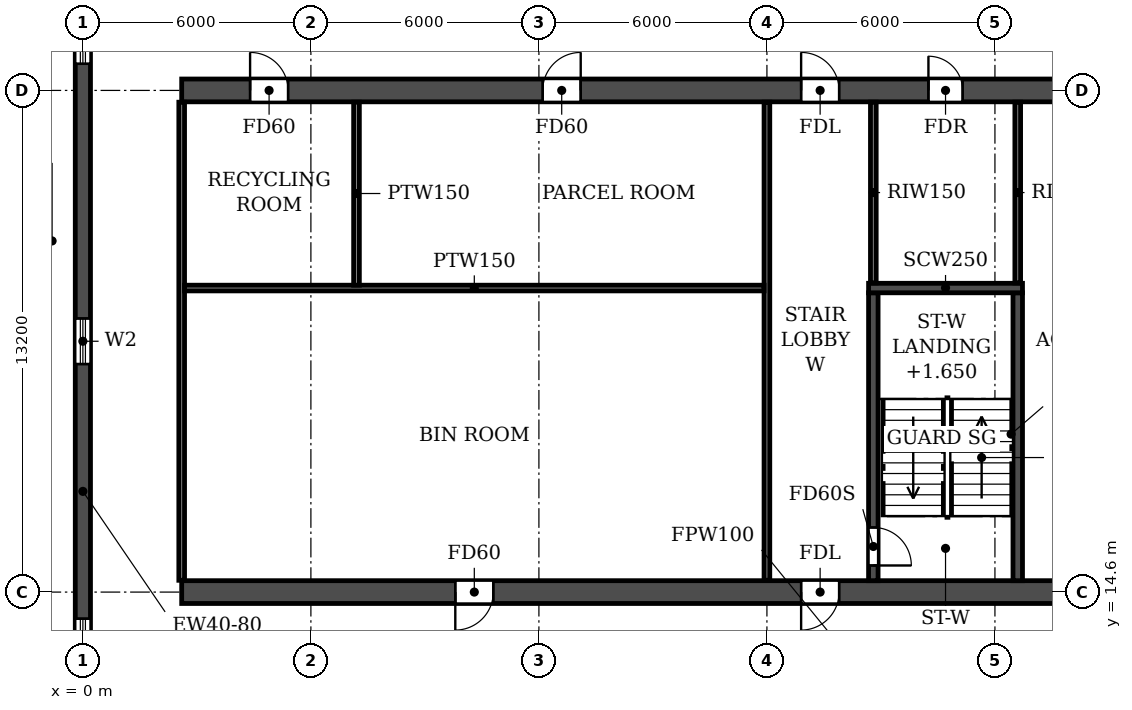
"""IFC4 building model, lengths in metres.
Left out: names, types, materials, properties, quantities, classifications, styles, units other than length and angle.
Written with IfcOpenShell. Run it as: python <this file> out.ifc"""

import sys

from ifc_helpers import new_model, si_unit, direction, frame, frame_2d, origin, place, context, subcontext, project, spatial, rectangle, extrude, element, fill, save


model = new_model("IFC4")
c1 = context("Model", 3, precision=1e-05, world=origin(), true_north=direction((0.0, 1.0)))
c2 = subcontext(c1, "Body", "Model", "MODEL_VIEW")
j1 = project(units=[si_unit("LENGTHUNIT", "METRE"), si_unit("PLANEANGLEUNIT", "RADIAN")], contexts=[c1])
p1 = place(None, origin())
s1 = spatial("IfcSite", under=j1, at=p1, CompositionType="ELEMENT")
p2 = place(p1, origin())
s2 = spatial("IfcBuilding", under=s1, at=p2, CompositionType="ELEMENT")
p3 = place(p2, frame((0.0, 0.0, 23.4)))
s3 = spatial("IfcBuildingStorey", under=s2, at=p3, CompositionType="ELEMENT", Elevation=23.4)
p4 = place(p3, frame((0.0, 4.683, 0.0), z_axis=(0.0, 0.0, 1.0), x_axis=(0.0, 1.0, 0.0)))
e1 = element("IfcWall", 1, at=p4, inside=s3, PredefinedType="SHEAR", context=c2, shape_type="SweptSolid", body=[
    extrude(rectangle(XDim=35.434, YDim=0.4, at=frame_2d((17.717, 0.0))), origin(), (0.0, 0.0, 1.0), 3.05),
])
p5 = place(p4, frame((23.817, 0.0, 0.9)))
e2 = element("IfcOpeningElement", 2, at=p5, cuts=e1, PredefinedType="OPENING", context=c2, shape_type="SweptSolid", body=[
    extrude(rectangle(XDim=1.2, YDim=1.5, at=frame_2d((0.6, 0.75))), frame((0.0, 0.21, 0.0), z_axis=(0.0, -1.0, 0.0), x_axis=(1.0, 0.0, 0.0)), (0.0, 0.0, 1.0), 0.42),
])
p6 = place(p4, frame((8.017, 0.0, 0.9)))
e3 = element("IfcOpeningElement", 3, at=p6, cuts=e1, PredefinedType="OPENING", context=c2, shape_type="SweptSolid", body=[
    extrude(rectangle(XDim=1.2, YDim=1.5, at=frame_2d((0.6, 0.75))), frame((0.0, 0.21, 0.0), z_axis=(0.0, -1.0, 0.0), x_axis=(1.0, 0.0, 0.0)), (0.0, 0.0, 1.0), 0.42),
])
p7 = place(p4, frame((15.917, 0.0, 0.9)))
e4 = element("IfcOpeningElement", 4, at=p7, cuts=e1, PredefinedType="OPENING", context=c2, shape_type="SweptSolid", body=[
    extrude(rectangle(XDim=1.2, YDim=1.5, at=frame_2d((0.6, 0.75))), frame((0.0, 0.21, 0.0), z_axis=(0.0, -1.0, 0.0), x_axis=(1.0, 0.0, 0.0)), (0.0, 0.0, 1.0), 0.42),
])
p8 = place(p4, frame((29.493, 0.0, 0.6)))
e5 = element("IfcOpeningElement", 5, at=p8, cuts=e1, PredefinedType="OPENING", context=c2, shape_type="SweptSolid", body=[
    extrude(rectangle(XDim=2.2, YDim=1.8, at=frame_2d((1.1, 0.9))), frame((0.0, 0.21, 0.0), z_axis=(0.0, -1.0, 0.0), x_axis=(1.0, 0.0, 0.0)), (0.0, 0.0, 1.0), 0.42),
])
p9 = place(p4, frame((2.541, 0.0, 0.6)))
e6 = element("IfcOpeningElement", 6, at=p9, cuts=e1, PredefinedType="OPENING", context=c2, shape_type="SweptSolid", body=[
    extrude(rectangle(XDim=2.2, YDim=1.8, at=frame_2d((1.1, 0.9))), frame((0.0, 0.21, 0.0), z_axis=(0.0, -1.0, 0.0), x_axis=(1.0, 0.0, 0.0)), (0.0, 0.0, 1.0), 0.42),
])
p10 = place(p3, frame((2.6, 14.6, 0.0), z_axis=(0.0, 0.0, 1.0), x_axis=(1.0, 0.0, 0.0)))
e7 = element("IfcWall", 7, at=p10, inside=s3, PredefinedType="SOLIDWALL", context=c2, shape_type="SweptSolid", body=[
    extrude(rectangle(XDim=96.8, YDim=0.6, at=frame_2d((48.4, 0.0))), origin(), (0.0, 0.0, 1.0), 3.05),
])
p11 = place(p10, frame((7.2, 0.0, 0.0)))
e8 = element("IfcOpeningElement", 8, at=p11, cuts=e7, PredefinedType="OPENING", context=c2, shape_type="SweptSolid", body=[
    extrude(rectangle(XDim=1.0, YDim=2.1, at=frame_2d((0.5, 1.05))), frame((0.0, 0.31, 0.0), z_axis=(0.0, -1.0, 0.0), x_axis=(1.0, 0.0, 0.0)), (0.0, 0.0, 1.0), 0.62),
])
p12 = place(p10, frame((16.3, 0.0, 0.0)))
e9 = element("IfcOpeningElement", 9, at=p12, cuts=e7, PredefinedType="OPENING", context=c2, shape_type="SweptSolid", body=[
    extrude(rectangle(XDim=1.0, YDim=2.1, at=frame_2d((0.5, 1.05))), frame((0.0, 0.31, 0.0), z_axis=(0.0, -1.0, 0.0), x_axis=(1.0, 0.0, 0.0)), (0.0, 0.0, 1.0), 0.62),
])
p13 = place(p10, frame((24.2, 0.0, 0.0)))
e10 = element("IfcOpeningElement", 10, at=p13, cuts=e7, PredefinedType="OPENING", context=c2, shape_type="SweptSolid", body=[
    extrude(rectangle(XDim=1.0, YDim=2.1, at=frame_2d((0.5, 1.05))), frame((0.0, 0.31, 0.0), z_axis=(0.0, -1.0, 0.0), x_axis=(1.0, 0.0, 0.0)), (0.0, 0.0, 1.0), 0.62),
])
p14 = place(p10, frame((28.8, 0.0, 0.0)))
e11 = element("IfcOpeningElement", 11, at=p14, cuts=e7, PredefinedType="OPENING", context=c2, shape_type="SweptSolid", body=[
    extrude(rectangle(XDim=1.0, YDim=2.1, at=frame_2d((0.5, 1.05))), frame((0.0, 0.31, 0.0), z_axis=(0.0, -1.0, 0.0), x_axis=(1.0, 0.0, 0.0)), (0.0, 0.0, 1.0), 0.62),
])
p15 = place(p10, frame((40.1, 0.0, 0.0)))
e12 = element("IfcOpeningElement", 12, at=p15, cuts=e7, PredefinedType="OPENING", context=c2, shape_type="SweptSolid", body=[
    extrude(rectangle(XDim=1.0, YDim=2.1, at=frame_2d((0.5, 1.05))), frame((0.0, 0.31, 0.0), z_axis=(0.0, -1.0, 0.0), x_axis=(1.0, 0.0, 0.0)), (0.0, 0.0, 1.0), 0.62),
])
p16 = place(p10, frame((44.0, 0.0, 0.0)))
e13 = element("IfcOpeningElement", 13, at=p16, cuts=e7, PredefinedType="OPENING", context=c2, shape_type="SweptSolid", body=[
    extrude(rectangle(XDim=1.0, YDim=2.1, at=frame_2d((0.5, 1.05))), frame((0.0, 0.31, 0.0), z_axis=(0.0, -1.0, 0.0), x_axis=(1.0, 0.0, 0.0)), (0.0, 0.0, 1.0), 0.62),
])
p17 = place(p10, frame((47.9, 0.0, 0.0)))
e14 = element("IfcOpeningElement", 14, at=p17, cuts=e7, PredefinedType="OPENING", context=c2, shape_type="SweptSolid", body=[
    extrude(rectangle(XDim=1.0, YDim=2.1, at=frame_2d((0.5, 1.05))), frame((0.0, 0.31, 0.0), z_axis=(0.0, -1.0, 0.0), x_axis=(1.0, 0.0, 0.0)), (0.0, 0.0, 1.0), 0.62),
])
p18 = place(p10, frame((53.1, 0.0, 0.0)))
e15 = element("IfcOpeningElement", 15, at=p18, cuts=e7, PredefinedType="OPENING", context=c2, shape_type="SweptSolid", body=[
    extrude(rectangle(XDim=1.0, YDim=2.1, at=frame_2d((0.5, 1.05))), frame((0.0, 0.31, 0.0), z_axis=(0.0, -1.0, 0.0), x_axis=(1.0, 0.0, 0.0)), (0.0, 0.0, 1.0), 0.62),
])
p19 = place(p10, frame((67.0, 0.0, 0.0)))
e16 = element("IfcOpeningElement", 16, at=p19, cuts=e7, PredefinedType="OPENING", context=c2, shape_type="SweptSolid", body=[
    extrude(rectangle(XDim=1.0, YDim=2.1, at=frame_2d((0.5, 1.05))), frame((0.0, 0.31, 0.0), z_axis=(0.0, -1.0, 0.0), x_axis=(1.0, 0.0, 0.0)), (0.0, 0.0, 1.0), 0.62),
])
p20 = place(p10, frame((71.6, 0.0, 0.0)))
e17 = element("IfcOpeningElement", 17, at=p20, cuts=e7, PredefinedType="OPENING", context=c2, shape_type="SweptSolid", body=[
    extrude(rectangle(XDim=1.0, YDim=2.1, at=frame_2d((0.5, 1.05))), frame((0.0, 0.31, 0.0), z_axis=(0.0, -1.0, 0.0), x_axis=(1.0, 0.0, 0.0)), (0.0, 0.0, 1.0), 0.62),
])
p21 = place(p10, frame((79.5, 0.0, 0.0)))
e18 = element("IfcOpeningElement", 18, at=p21, cuts=e7, PredefinedType="OPENING", context=c2, shape_type="SweptSolid", body=[
    extrude(rectangle(XDim=1.0, YDim=2.1, at=frame_2d((0.5, 1.05))), frame((0.0, 0.31, 0.0), z_axis=(0.0, -1.0, 0.0), x_axis=(1.0, 0.0, 0.0)), (0.0, 0.0, 1.0), 0.62),
])
p22 = place(p10, frame((83.15, 0.0, 0.0)))
e19 = element("IfcOpeningElement", 19, at=p22, cuts=e7, PredefinedType="OPENING", context=c2, shape_type="SweptSolid", body=[
    extrude(rectangle(XDim=1.0, YDim=2.1, at=frame_2d((0.5, 1.05))), frame((0.0, 0.31, 0.0), z_axis=(0.0, -1.0, 0.0), x_axis=(1.0, 0.0, 0.0)), (0.0, 0.0, 1.0), 0.62),
])
p23 = place(p10, frame((90.85, 0.0, 0.0)))
e20 = element("IfcOpeningElement", 20, at=p23, cuts=e7, PredefinedType="OPENING", context=c2, shape_type="SweptSolid", body=[
    extrude(rectangle(XDim=1.0, YDim=2.1, at=frame_2d((0.5, 1.05))), frame((0.0, 0.31, 0.0), z_axis=(0.0, -1.0, 0.0), x_axis=(1.0, 0.0, 0.0)), (0.0, 0.0, 1.0), 0.62),
])
p24 = place(p3, frame((2.6, 27.8, 0.0), z_axis=(0.0, 0.0, 1.0), x_axis=(1.0, 0.0, 0.0)))
e21 = element("IfcWall", 21, at=p24, inside=s3, PredefinedType="SOLIDWALL", context=c2, shape_type="SweptSolid", body=[
    extrude(rectangle(XDim=96.8, YDim=0.6, at=frame_2d((48.4, 0.0))), origin(), (0.0, 0.0, 1.0), 3.05),
])
p25 = place(p24, frame((1.8, 0.0, 0.0)))
e22 = element("IfcOpeningElement", 22, at=p25, cuts=e21, PredefinedType="OPENING", context=c2, shape_type="SweptSolid", body=[
    extrude(rectangle(XDim=1.0, YDim=2.1, at=frame_2d((0.5, 1.05))), frame((0.0, 0.31, 0.0), z_axis=(0.0, -1.0, 0.0), x_axis=(1.0, 0.0, 0.0)), (0.0, 0.0, 1.0), 0.62),
])
p26 = place(p24, frame((9.5, 0.0, 0.0)))
e23 = element("IfcOpeningElement", 23, at=p26, cuts=e21, PredefinedType="OPENING", context=c2, shape_type="SweptSolid", body=[
    extrude(rectangle(XDim=1.0, YDim=2.1, at=frame_2d((0.5, 1.05))), frame((0.0, 0.31, 0.0), z_axis=(0.0, -1.0, 0.0), x_axis=(1.0, 0.0, 0.0)), (0.0, 0.0, 1.0), 0.62),
])
p27 = place(p24, frame((16.3, 0.0, 0.0)))
e24 = element("IfcOpeningElement", 24, at=p27, cuts=e21, PredefinedType="OPENING", context=c2, shape_type="SweptSolid", body=[
    extrude(rectangle(XDim=1.0, YDim=2.1, at=frame_2d((0.5, 1.05))), frame((0.0, 0.31, 0.0), z_axis=(0.0, -1.0, 0.0), x_axis=(1.0, 0.0, 0.0)), (0.0, 0.0, 1.0), 0.62),
])
p28 = place(p24, frame((19.65, 0.0, 0.0)))
e25 = element("IfcOpeningElement", 25, at=p28, cuts=e21, PredefinedType="OPENING", context=c2, shape_type="SweptSolid", body=[
    extrude(rectangle(XDim=0.9, YDim=2.1, at=frame_2d((0.45, 1.05))), frame((0.0, 0.31, 0.0), z_axis=(0.0, -1.0, 0.0), x_axis=(1.0, 0.0, 0.0)), (0.0, 0.0, 1.0), 0.62),
])
p29 = place(p24, frame((28.85, 0.0, 0.0)))
e26 = element("IfcOpeningElement", 26, at=p29, cuts=e21, PredefinedType="OPENING", context=c2, shape_type="SweptSolid", body=[
    extrude(rectangle(XDim=0.9, YDim=2.1, at=frame_2d((0.45, 1.05))), frame((0.0, 0.31, 0.0), z_axis=(0.0, -1.0, 0.0), x_axis=(1.0, 0.0, 0.0)), (0.0, 0.0, 1.0), 0.62),
])
p30 = place(p24, frame((32.0, 0.0, 0.0)))
e27 = element("IfcOpeningElement", 27, at=p30, cuts=e21, PredefinedType="OPENING", context=c2, shape_type="SweptSolid", body=[
    extrude(rectangle(XDim=1.0, YDim=2.1, at=frame_2d((0.5, 1.05))), frame((0.0, 0.31, 0.0), z_axis=(0.0, -1.0, 0.0), x_axis=(1.0, 0.0, 0.0)), (0.0, 0.0, 1.0), 0.62),
])
p31 = place(p24, frame((37.2, 0.0, 0.0)))
e28 = element("IfcOpeningElement", 28, at=p31, cuts=e21, PredefinedType="OPENING", context=c2, shape_type="SweptSolid", body=[
    extrude(rectangle(XDim=1.0, YDim=2.1, at=frame_2d((0.5, 1.05))), frame((0.0, 0.31, 0.0), z_axis=(0.0, -1.0, 0.0), x_axis=(1.0, 0.0, 0.0)), (0.0, 0.0, 1.0), 0.62),
])
p32 = place(p24, frame((45.0, 0.0, 0.0)))
e29 = element("IfcOpeningElement", 29, at=p32, cuts=e21, PredefinedType="OPENING", context=c2, shape_type="SweptSolid", body=[
    extrude(rectangle(XDim=1.0, YDim=2.1, at=frame_2d((0.5, 1.05))), frame((0.0, 0.31, 0.0), z_axis=(0.0, -1.0, 0.0), x_axis=(1.0, 0.0, 0.0)), (0.0, 0.0, 1.0), 0.62),
])
p33 = place(p24, frame((47.9, 0.0, 0.0)))
e30 = element("IfcOpeningElement", 30, at=p33, cuts=e21, PredefinedType="OPENING", context=c2, shape_type="SweptSolid", body=[
    extrude(rectangle(XDim=1.0, YDim=2.1, at=frame_2d((0.5, 1.05))), frame((0.0, 0.31, 0.0), z_axis=(0.0, -1.0, 0.0), x_axis=(1.0, 0.0, 0.0)), (0.0, 0.0, 1.0), 0.62),
])
p34 = place(p24, frame((52.1, 0.0, 0.0)))
e31 = element("IfcOpeningElement", 31, at=p34, cuts=e21, PredefinedType="OPENING", context=c2, shape_type="SweptSolid", body=[
    extrude(rectangle(XDim=1.0, YDim=2.1, at=frame_2d((0.5, 1.05))), frame((0.0, 0.31, 0.0), z_axis=(0.0, -1.0, 0.0), x_axis=(1.0, 0.0, 0.0)), (0.0, 0.0, 1.0), 0.62),
])
p35 = place(p24, frame((56.0, 0.0, 0.0)))
e32 = element("IfcOpeningElement", 32, at=p35, cuts=e21, PredefinedType="OPENING", context=c2, shape_type="SweptSolid", body=[
    extrude(rectangle(XDim=1.0, YDim=2.1, at=frame_2d((0.5, 1.05))), frame((0.0, 0.31, 0.0), z_axis=(0.0, -1.0, 0.0), x_axis=(1.0, 0.0, 0.0)), (0.0, 0.0, 1.0), 0.62),
])
p36 = place(p24, frame((58.6, 0.0, 0.0)))
e33 = element("IfcOpeningElement", 33, at=p36, cuts=e21, PredefinedType="OPENING", context=c2, shape_type="SweptSolid", body=[
    extrude(rectangle(XDim=1.0, YDim=2.1, at=frame_2d((0.5, 1.05))), frame((0.0, 0.31, 0.0), z_axis=(0.0, -1.0, 0.0), x_axis=(1.0, 0.0, 0.0)), (0.0, 0.0, 1.0), 0.62),
])
p37 = place(p24, frame((61.2, 0.0, 0.0)))
e34 = element("IfcOpeningElement", 34, at=p37, cuts=e21, PredefinedType="OPENING", context=c2, shape_type="SweptSolid", body=[
    extrude(rectangle(XDim=1.0, YDim=2.1, at=frame_2d((0.5, 1.05))), frame((0.0, 0.31, 0.0), z_axis=(0.0, -1.0, 0.0), x_axis=(1.0, 0.0, 0.0)), (0.0, 0.0, 1.0), 0.62),
])
p38 = place(p24, frame((63.8, 0.0, 0.0)))
e35 = element("IfcOpeningElement", 35, at=p38, cuts=e21, PredefinedType="OPENING", context=c2, shape_type="SweptSolid", body=[
    extrude(rectangle(XDim=1.0, YDim=2.1, at=frame_2d((0.5, 1.05))), frame((0.0, 0.31, 0.0), z_axis=(0.0, -1.0, 0.0), x_axis=(1.0, 0.0, 0.0)), (0.0, 0.0, 1.0), 0.62),
])
p39 = place(p24, frame((67.05, 0.0, 0.0)))
e36 = element("IfcOpeningElement", 36, at=p39, cuts=e21, PredefinedType="OPENING", context=c2, shape_type="SweptSolid", body=[
    extrude(rectangle(XDim=0.9, YDim=2.1, at=frame_2d((0.45, 1.05))), frame((0.0, 0.31, 0.0), z_axis=(0.0, -1.0, 0.0), x_axis=(1.0, 0.0, 0.0)), (0.0, 0.0, 1.0), 0.62),
])
p40 = place(p24, frame((76.25, 0.0, 0.0)))
e37 = element("IfcOpeningElement", 37, at=p40, cuts=e21, PredefinedType="OPENING", context=c2, shape_type="SweptSolid", body=[
    extrude(rectangle(XDim=0.9, YDim=2.1, at=frame_2d((0.45, 1.05))), frame((0.0, 0.31, 0.0), z_axis=(0.0, -1.0, 0.0), x_axis=(1.0, 0.0, 0.0)), (0.0, 0.0, 1.0), 0.62),
])
p41 = place(p24, frame((79.5, 0.0, 0.0)))
e38 = element("IfcOpeningElement", 38, at=p41, cuts=e21, PredefinedType="OPENING", context=c2, shape_type="SweptSolid", body=[
    extrude(rectangle(XDim=1.0, YDim=2.1, at=frame_2d((0.5, 1.05))), frame((0.0, 0.31, 0.0), z_axis=(0.0, -1.0, 0.0), x_axis=(1.0, 0.0, 0.0)), (0.0, 0.0, 1.0), 0.62),
])
p42 = place(p24, frame((88.6, 0.0, 0.0)))
e39 = element("IfcOpeningElement", 39, at=p42, cuts=e21, PredefinedType="OPENING", context=c2, shape_type="SweptSolid", body=[
    extrude(rectangle(XDim=1.0, YDim=2.1, at=frame_2d((0.5, 1.05))), frame((0.0, 0.31, 0.0), z_axis=(0.0, -1.0, 0.0), x_axis=(1.0, 0.0, 0.0)), (0.0, 0.0, 1.0), 0.62),
])
p43 = place(p3, frame((20.8, 14.9, 0.0), z_axis=(0.0, 0.0, 1.0), x_axis=(0.0, 1.0, 0.0)))
e40 = element("IfcWall", 40, at=p43, inside=s3, PredefinedType="SOLIDWALL", context=c2, shape_type="SweptSolid", body=[
    extrude(rectangle(XDim=7.575, YDim=0.25, at=frame_2d((3.788, 0.0))), origin(), (0.0, 0.0, 1.0), 3.05),
])
p44 = place(p43, frame((0.4, 0.0, 0.0)))
e41 = element("IfcOpeningElement", 41, at=p44, cuts=e40, PredefinedType="OPENING", context=c2, shape_type="SweptSolid", body=[
    extrude(rectangle(XDim=1.0, YDim=2.1, at=frame_2d((0.5, 1.05))), frame((0.0, 0.135, 0.0), z_axis=(0.0, -1.0, 0.0), x_axis=(1.0, 0.0, 0.0)), (0.0, 0.0, 1.0), 0.27),
])
p45 = place(p3, frame((24.6, 14.9, 0.0), z_axis=(0.0, 0.0, 1.0), x_axis=(0.0, 1.0, 0.0)))
e42 = element("IfcWall", 42, at=p45, inside=s3, PredefinedType="SOLIDWALL", context=c2, shape_type="SweptSolid", body=[
    extrude(rectangle(XDim=7.575, YDim=0.25, at=frame_2d((3.788, 0.0))), origin(), (0.0, 0.0, 1.0), 3.05),
])
p46 = place(p3, frame((20.675, 22.6, 0.0), z_axis=(0.0, 0.0, 1.0), x_axis=(1.0, 0.0, 0.0)))
e43 = element("IfcWall", 43, at=p46, inside=s3, PredefinedType="SOLIDWALL", context=c2, shape_type="SweptSolid", body=[
    extrude(rectangle(XDim=4.05, YDim=0.25, at=frame_2d((2.025, 0.0))), origin(), (0.0, 0.0, 1.0), 3.05),
])
for number, where, z_axis, x_axis in (
    (44, (2.6, 14.91, 0.0), (0.0, 0.0, 1.0), (0.0, 1.0, 0.0)),
    (45, (18.0, 14.91, 0.0), (0.0, 0.0, 1.0), (0.0, 1.0, 0.0)),
):
    element("IfcWall", number, at=place(p3, frame(where, z_axis=z_axis, x_axis=x_axis)), inside=s3, PredefinedType="PARTITIONING", context=c2, shape_type="SweptSolid", body=[
        extrude(rectangle(XDim=12.58, YDim=0.15, at=frame_2d((6.29, 0.0))), origin(), (0.0, 0.0, 1.0), 3.05),
    ])
p47 = place(p3, frame((2.675, 22.6, 0.0), z_axis=(0.0, 0.0, 1.0), x_axis=(1.0, 0.0, 0.0)))
e46 = element("IfcWall", 46, at=p47, inside=s3, PredefinedType="PARTITIONING", context=c2, shape_type="SweptSolid", body=[
    extrude(rectangle(XDim=15.25, YDim=0.15, at=frame_2d((7.625, 0.0))), origin(), (0.0, 0.0, 1.0), 3.05),
])
p48 = place(p3, frame((7.2, 22.675, 0.0), z_axis=(0.0, 0.0, 1.0), x_axis=(0.0, 1.0, 0.0)))
e47 = element("IfcWall", 47, at=p48, inside=s3, PredefinedType="PARTITIONING", context=c2, shape_type="SweptSolid", body=[
    extrude(rectangle(XDim=4.815, YDim=0.15, at=frame_2d((2.407, 0.0))), origin(), (0.0, 0.0, 1.0), 3.05),
])
for number, where, z_axis, x_axis in (
    (48, (20.8, 22.735, 0.0), (0.0, 0.0, 1.0), (0.0, 1.0, 0.0)),
    (49, (24.6, 22.735, 0.0), (0.0, 0.0, 1.0), (0.0, 1.0, 0.0)),
):
    element("IfcWall", number, at=place(p3, frame(where, z_axis=z_axis, x_axis=x_axis)), inside=s3, PredefinedType="PARTITIONING", context=c2, shape_type="SweptSolid", body=[
        extrude(rectangle(XDim=4.755, YDim=0.15, at=frame_2d((2.377, 0.0))), origin(), (0.0, 0.0, 1.0), 3.05),
    ])
p49 = place(p5, origin())
e50 = element("IfcWindow", 50, at=p49, inside=s3, PartitioningType="SINGLE_PANEL", PredefinedType="WINDOW", context=c2, shape_type="SweptSolid", body=[
    extrude(rectangle(XDim=1.2, YDim=1.5, at=frame_2d((0.6, 0.75))), frame((0.0, 0.03, 0.0), z_axis=(0.0, -1.0, 0.0), x_axis=(1.0, 0.0, 0.0)), (0.0, 0.0, 1.0), 0.06),
])
fill(e2, e50)
p50 = place(p6, origin())
e51 = element("IfcWindow", 51, at=p50, inside=s3, PartitioningType="SINGLE_PANEL", PredefinedType="WINDOW", context=c2, shape_type="SweptSolid", body=[
    extrude(rectangle(XDim=1.2, YDim=1.5, at=frame_2d((0.6, 0.75))), frame((0.0, 0.03, 0.0), z_axis=(0.0, -1.0, 0.0), x_axis=(1.0, 0.0, 0.0)), (0.0, 0.0, 1.0), 0.06),
])
fill(e3, e51)
p51 = place(p7, origin())
e52 = element("IfcWindow", 52, at=p51, inside=s3, PartitioningType="SINGLE_PANEL", PredefinedType="WINDOW", context=c2, shape_type="SweptSolid", body=[
    extrude(rectangle(XDim=1.2, YDim=1.5, at=frame_2d((0.6, 0.75))), frame((0.0, 0.03, 0.0), z_axis=(0.0, -1.0, 0.0), x_axis=(1.0, 0.0, 0.0)), (0.0, 0.0, 1.0), 0.06),
])
fill(e4, e52)
p52 = place(p25, origin())
e53 = element("IfcDoor", 53, at=p52, inside=s3, OperationType="SINGLE_SWING_LEFT", PredefinedType="DOOR", context=c2, shape_type="SweptSolid", body=[
    extrude(rectangle(XDim=1.0, YDim=2.1, at=frame_2d((0.5, 1.05))), frame((0.0, 0.025, 0.0), z_axis=(0.0, -1.0, 0.0), x_axis=(1.0, 0.0, 0.0)), (0.0, 0.0, 1.0), 0.05),
])
fill(e22, e53)
p53 = place(p26, origin())
e54 = element("IfcDoor", 54, at=p53, inside=s3, OperationType="SINGLE_SWING_RIGHT", PredefinedType="DOOR", context=c2, shape_type="SweptSolid", body=[
    extrude(rectangle(XDim=1.0, YDim=2.1, at=frame_2d((0.5, 1.05))), frame((0.0, 0.025, 0.0), z_axis=(0.0, -1.0, 0.0), x_axis=(1.0, 0.0, 0.0)), (0.0, 0.0, 1.0), 0.05),
])
fill(e23, e54)
p54 = place(p27, origin())
e55 = element("IfcDoor", 55, at=p54, inside=s3, OperationType="SINGLE_SWING_LEFT", PredefinedType="DOOR", context=c2, shape_type="SweptSolid", body=[
    extrude(rectangle(XDim=1.0, YDim=2.1, at=frame_2d((0.5, 1.05))), frame((0.0, 0.025, 0.0), z_axis=(0.0, -1.0, 0.0), x_axis=(1.0, 0.0, 0.0)), (0.0, 0.0, 1.0), 0.05),
])
fill(e24, e55)
p55 = place(p28, origin())
e56 = element("IfcDoor", 56, at=p55, inside=s3, OperationType="SINGLE_SWING_LEFT", PredefinedType="DOOR", context=c2, shape_type="SweptSolid", body=[
    extrude(rectangle(XDim=0.9, YDim=2.1, at=frame_2d((0.45, 1.05))), frame((0.0, 0.025, 0.0), z_axis=(0.0, -1.0, 0.0), x_axis=(1.0, 0.0, 0.0)), (0.0, 0.0, 1.0), 0.05),
])
fill(e25, e56)
p56 = place(p11, frame((1.0, 0.0, 0.0), z_axis=(0.0, 0.0, 1.0), x_axis=(-1.0, 0.0, 0.0)))
e57 = element("IfcDoor", 57, at=p56, inside=s3, OperationType="SINGLE_SWING_RIGHT", PredefinedType="DOOR", context=c2, shape_type="SweptSolid", body=[
    extrude(rectangle(XDim=1.0, YDim=2.1, at=frame_2d((0.5, 1.05))), frame((0.0, 0.025, 0.0), z_axis=(0.0, -1.0, 0.0), x_axis=(1.0, 0.0, 0.0)), (0.0, 0.0, 1.0), 0.05),
])
fill(e8, e57)
p57 = place(p12, frame((1.0, 0.0, 0.0), z_axis=(0.0, 0.0, 1.0), x_axis=(-1.0, 0.0, 0.0)))
e58 = element("IfcDoor", 58, at=p57, inside=s3, OperationType="SINGLE_SWING_RIGHT", PredefinedType="DOOR", context=c2, shape_type="SweptSolid", body=[
    extrude(rectangle(XDim=1.0, YDim=2.1, at=frame_2d((0.5, 1.05))), frame((0.0, 0.025, 0.0), z_axis=(0.0, -1.0, 0.0), x_axis=(1.0, 0.0, 0.0)), (0.0, 0.0, 1.0), 0.05),
])
fill(e9, e58)
p58 = place(p44, frame((1.0, 0.0, 0.0), z_axis=(0.0, 0.0, 1.0), x_axis=(-1.0, 0.0, 0.0)))
e59 = element("IfcDoor", 59, at=p58, inside=s3, OperationType="SINGLE_SWING_RIGHT", PredefinedType="DOOR", context=c2, shape_type="SweptSolid", body=[
    extrude(rectangle(XDim=1.0, YDim=2.1, at=frame_2d((0.5, 1.05))), frame((0.0, 0.025, 0.0), z_axis=(0.0, -1.0, 0.0), x_axis=(1.0, 0.0, 0.0)), (0.0, 0.0, 1.0), 0.05),
])
fill(e41, e59)
save(model, sys.argv[1])
